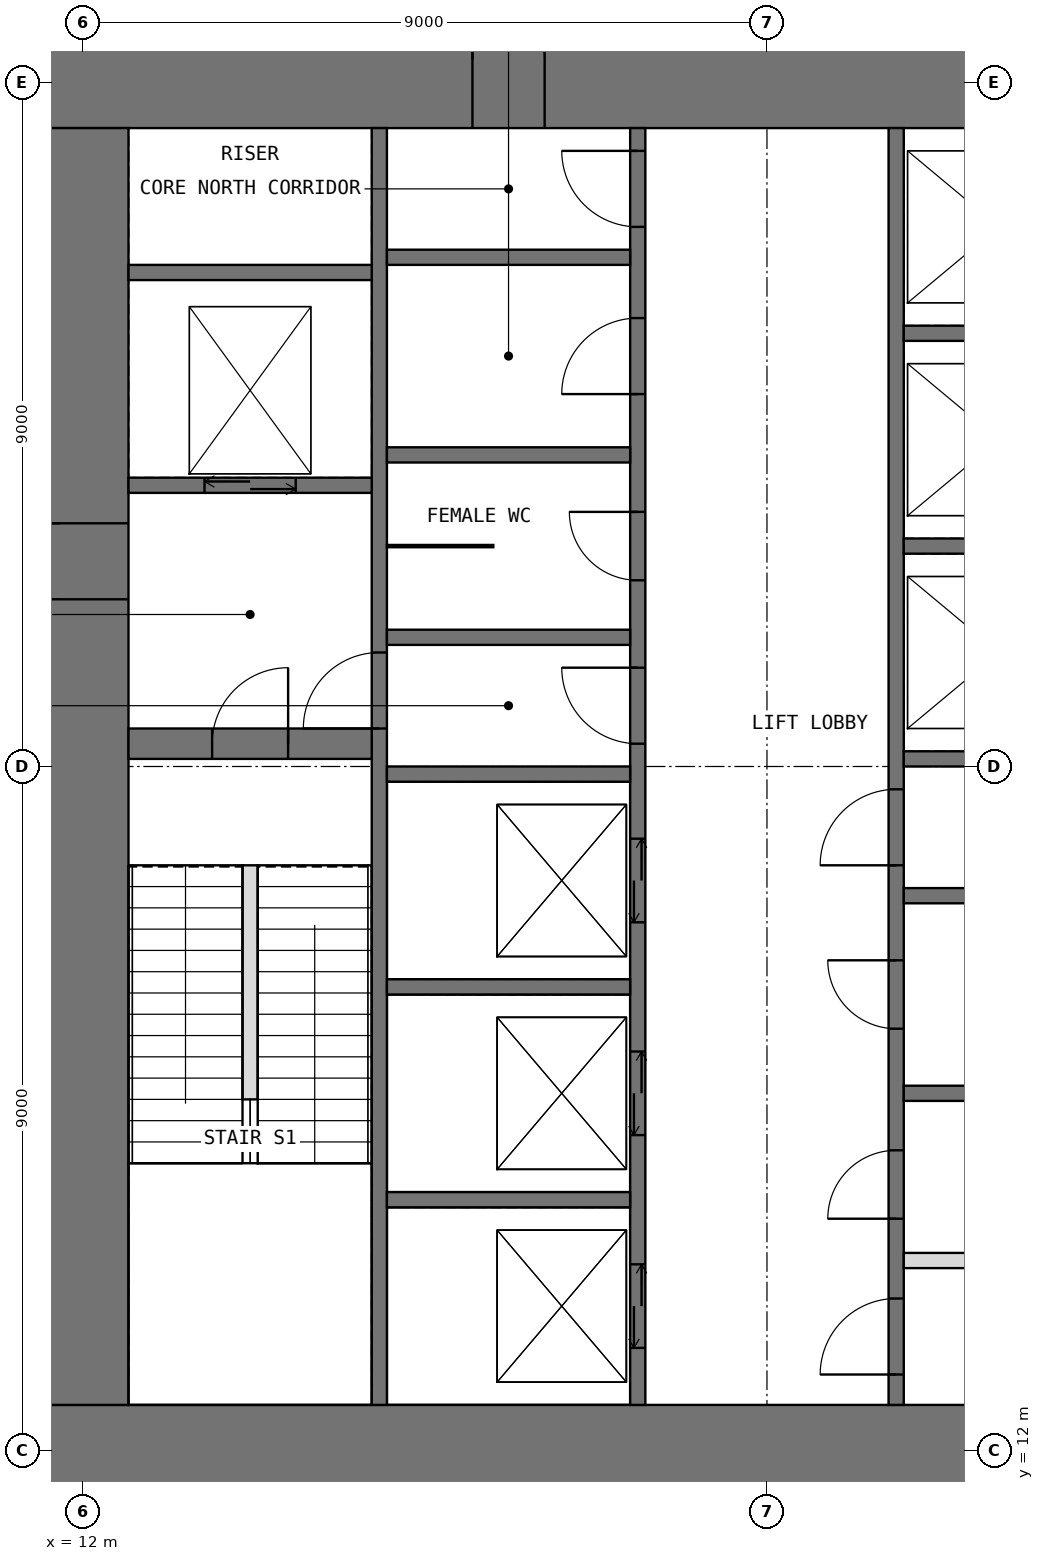
"""IFC4 building model, lengths in metres.
Left out: names, types, materials, properties, quantities, classifications, styles, units other than length and angle.
Written with IfcOpenShell. Run it as: python <this file> out.ifc"""

import sys

from ifc_helpers import new_model, si_unit, direction, frame, frame_2d, origin, place, context, subcontext, project, spatial, rectangle, extrude, element, fill, save


model = new_model("IFC4")
c1 = context("Model", 3, precision=1e-05, world=origin(), true_north=direction((0.0, 1.0)))
c2 = subcontext(c1, "Body", "Model", "MODEL_VIEW")
j1 = project(units=[si_unit("LENGTHUNIT", "METRE"), si_unit("PLANEANGLEUNIT", "RADIAN")], contexts=[c1])
p1 = place(None, origin())
s1 = spatial("IfcSite", under=j1, at=p1, CompositionType="ELEMENT")
p2 = place(p1, origin())
s2 = spatial("IfcBuilding", under=s1, at=p2, CompositionType="ELEMENT")
p3 = place(p2, frame((0.0, 0.0, 86.5)))
s3 = spatial("IfcBuildingStorey", under=s2, at=p3, CompositionType="ELEMENT", Elevation=86.5)
p4 = place(p3, frame((10.8, 11.7, -0.25), z_axis=(0.0, 0.0, 1.0), x_axis=(1.0, 0.0, 0.0)))
e1 = element("IfcWall", 1, at=p4, inside=s3, PredefinedType="SHEAR", context=c2, shape_type="SweptSolid", body=[
    extrude(rectangle(XDim=20.4, YDim=1.8, at=frame_2d((10.2, 0.0))), origin(), (0.0, 0.0, 1.0), 5.2),
])
p5 = place(p4, frame((13.125, 0.0, 0.25)))
e2 = element("IfcOpeningElement", 2, at=p5, cuts=e1, PredefinedType="OPENING", context=c2, shape_type="SweptSolid", body=[
    extrude(rectangle(XDim=0.95, YDim=2.4, at=frame_2d((0.475, 1.2))), frame((0.0, 0.91, 0.0), z_axis=(0.0, -1.0, 0.0), x_axis=(1.0, 0.0, 0.0)), (0.0, 0.0, 1.0), 1.82),
])
p6 = place(p3, frame((10.8, 30.3, -0.25), z_axis=(0.0, 0.0, 1.0), x_axis=(1.0, 0.0, 0.0)))
e3 = element("IfcWall", 3, at=p6, inside=s3, PredefinedType="SHEAR", context=c2, shape_type="SweptSolid", body=[
    extrude(rectangle(XDim=20.4, YDim=1.8, at=frame_2d((10.2, 0.0))), origin(), (0.0, 0.0, 1.0), 5.2),
])
p7 = place(p6, frame((6.325, 0.0, 0.25)))
e4 = element("IfcOpeningElement", 4, at=p7, cuts=e3, PredefinedType="OPENING", context=c2, shape_type="SweptSolid", body=[
    extrude(rectangle(XDim=0.95, YDim=2.4, at=frame_2d((0.475, 1.2))), frame((0.0, 0.91, 0.0), z_axis=(0.0, -1.0, 0.0), x_axis=(1.0, 0.0, 0.0)), (0.0, 0.0, 1.0), 1.82),
])
p8 = place(p3, frame((11.7, 12.6, -0.25), z_axis=(0.0, 0.0, 1.0), x_axis=(0.0, 1.0, 0.0)))
e5 = element("IfcWall", 5, at=p8, inside=s3, PredefinedType="SHEAR", context=c2, shape_type="SweptSolid", body=[
    extrude(rectangle(XDim=16.8, YDim=1.8, at=frame_2d((8.4, 0.0))), origin(), (0.0, 0.0, 1.0), 5.2),
])
p9 = place(p8, frame((10.6, 0.0, 0.25)))
e6 = element("IfcOpeningElement", 6, at=p9, cuts=e5, PredefinedType="OPENING", context=c2, shape_type="SweptSolid", body=[
    extrude(rectangle(XDim=1.0, YDim=2.2, at=frame_2d((0.5, 1.1))), frame((0.0, 0.91, 0.0), z_axis=(0.0, -1.0, 0.0), x_axis=(1.0, 0.0, 0.0)), (0.0, 0.0, 1.0), 1.82),
])
p10 = place(p3, frame((15.9, 12.6, -0.25), z_axis=(0.0, 0.0, 1.0), x_axis=(0.0, 1.0, 0.0)))
e7 = element("IfcWall", 7, at=p10, inside=s3, PredefinedType="SHEAR", context=c2, shape_type="SweptSolid", body=[
    extrude(rectangle(XDim=16.8, YDim=0.2, at=frame_2d((8.4, 0.0))), origin(), (0.0, 0.0, 1.0), 5.2),
])
p11 = place(p10, frame((8.9, 0.0, 0.25)))
e8 = element("IfcOpeningElement", 8, at=p11, cuts=e7, PredefinedType="OPENING", context=c2, shape_type="SweptSolid", body=[
    extrude(rectangle(XDim=1.0, YDim=2.2, at=frame_2d((0.5, 1.1))), frame((0.0, 0.11, 0.0), z_axis=(0.0, -1.0, 0.0), x_axis=(1.0, 0.0, 0.0)), (0.0, 0.0, 1.0), 0.22),
])
p12 = place(p3, frame((19.3, 12.6, -0.25), z_axis=(0.0, 0.0, 1.0), x_axis=(0.0, 1.0, 0.0)))
e9 = element("IfcWall", 9, at=p12, inside=s3, PredefinedType="SHEAR", context=c2, shape_type="SweptSolid", body=[
    extrude(rectangle(XDim=16.8, YDim=0.2, at=frame_2d((8.4, 0.0))), origin(), (0.0, 0.0, 1.0), 5.2),
])
p13 = place(p12, frame((8.7, 0.0, 0.25)))
e10 = element("IfcOpeningElement", 10, at=p13, cuts=e9, PredefinedType="OPENING", context=c2, shape_type="SweptSolid", body=[
    extrude(rectangle(XDim=1.0, YDim=2.2, at=frame_2d((0.5, 1.1))), frame((0.0, 0.11, 0.0), z_axis=(0.0, -1.0, 0.0), x_axis=(1.0, 0.0, 0.0)), (0.0, 0.0, 1.0), 0.22),
])
p14 = place(p12, frame((10.85, 0.0, 0.25)))
e11 = element("IfcOpeningElement", 11, at=p14, cuts=e9, PredefinedType="OPENING", context=c2, shape_type="SweptSolid", body=[
    extrude(rectangle(XDim=0.9, YDim=2.2, at=frame_2d((0.45, 1.1))), frame((0.0, 0.11, 0.0), z_axis=(0.0, -1.0, 0.0), x_axis=(1.0, 0.0, 0.0)), (0.0, 0.0, 1.0), 0.22),
])
p15 = place(p12, frame((13.3, 0.0, 0.25)))
e12 = element("IfcOpeningElement", 12, at=p15, cuts=e9, PredefinedType="OPENING", context=c2, shape_type="SweptSolid", body=[
    extrude(rectangle(XDim=1.0, YDim=2.2, at=frame_2d((0.5, 1.1))), frame((0.0, 0.11, 0.0), z_axis=(0.0, -1.0, 0.0), x_axis=(1.0, 0.0, 0.0)), (0.0, 0.0, 1.0), 0.22),
])
p16 = place(p12, frame((15.5, 0.0, 0.25)))
e13 = element("IfcOpeningElement", 13, at=p16, cuts=e9, PredefinedType="OPENING", context=c2, shape_type="SweptSolid", body=[
    extrude(rectangle(XDim=1.0, YDim=2.2, at=frame_2d((0.5, 1.1))), frame((0.0, 0.11, 0.0), z_axis=(0.0, -1.0, 0.0), x_axis=(1.0, 0.0, 0.0)), (0.0, 0.0, 1.0), 0.22),
])
p17 = place(p12, frame((0.75, 0.0, 0.25)))
e14 = element("IfcOpeningElement", 14, at=p17, cuts=e9, PredefinedType="OPENING", context=c2, shape_type="SweptSolid", body=[
    extrude(rectangle(XDim=1.1, YDim=2.2, at=frame_2d((0.55, 1.1))), frame((0.0, 0.11, 0.0), z_axis=(0.0, -1.0, 0.0), x_axis=(1.0, 0.0, 0.0)), (0.0, 0.0, 1.0), 0.22),
])
p18 = place(p12, frame((3.55, 0.0, 0.25)))
e15 = element("IfcOpeningElement", 15, at=p18, cuts=e9, PredefinedType="OPENING", context=c2, shape_type="SweptSolid", body=[
    extrude(rectangle(XDim=1.1, YDim=2.2, at=frame_2d((0.55, 1.1))), frame((0.0, 0.11, 0.0), z_axis=(0.0, -1.0, 0.0), x_axis=(1.0, 0.0, 0.0)), (0.0, 0.0, 1.0), 0.22),
])
p19 = place(p12, frame((6.35, 0.0, 0.25)))
e16 = element("IfcOpeningElement", 16, at=p19, cuts=e9, PredefinedType="OPENING", context=c2, shape_type="SweptSolid", body=[
    extrude(rectangle(XDim=1.1, YDim=2.2, at=frame_2d((0.55, 1.1))), frame((0.0, 0.11, 0.0), z_axis=(0.0, -1.0, 0.0), x_axis=(1.0, 0.0, 0.0)), (0.0, 0.0, 1.0), 0.22),
])
p20 = place(p3, frame((22.7, 12.6, -0.25), z_axis=(0.0, 0.0, 1.0), x_axis=(0.0, 1.0, 0.0)))
e17 = element("IfcWall", 17, at=p20, inside=s3, PredefinedType="SHEAR", context=c2, shape_type="SweptSolid", body=[
    extrude(rectangle(XDim=16.8, YDim=0.2, at=frame_2d((8.4, 0.0))), origin(), (0.0, 0.0, 1.0), 5.2),
])
p21 = place(p20, frame((0.4, 0.0, 0.25)))
e18 = element("IfcOpeningElement", 18, at=p21, cuts=e17, PredefinedType="OPENING", context=c2, shape_type="SweptSolid", body=[
    extrude(rectangle(XDim=1.0, YDim=2.2, at=frame_2d((0.5, 1.1))), frame((0.0, 0.11, 0.0), z_axis=(0.0, -1.0, 0.0), x_axis=(1.0, 0.0, 0.0)), (0.0, 0.0, 1.0), 0.22),
])
p22 = place(p20, frame((7.1, 0.0, 0.25)))
e19 = element("IfcOpeningElement", 19, at=p22, cuts=e17, PredefinedType="OPENING", context=c2, shape_type="SweptSolid", body=[
    extrude(rectangle(XDim=1.0, YDim=2.2, at=frame_2d((0.5, 1.1))), frame((0.0, 0.11, 0.0), z_axis=(0.0, -1.0, 0.0), x_axis=(1.0, 0.0, 0.0)), (0.0, 0.0, 1.0), 0.22),
])
p23 = place(p20, frame((2.45, 0.0, 0.25)))
e20 = element("IfcOpeningElement", 20, at=p23, cuts=e17, PredefinedType="OPENING", context=c2, shape_type="SweptSolid", body=[
    extrude(rectangle(XDim=0.9, YDim=2.2, at=frame_2d((0.45, 1.1))), frame((0.0, 0.11, 0.0), z_axis=(0.0, -1.0, 0.0), x_axis=(1.0, 0.0, 0.0)), (0.0, 0.0, 1.0), 0.22),
])
p24 = place(p20, frame((4.95, 0.0, 0.25)))
e21 = element("IfcOpeningElement", 21, at=p24, cuts=e17, PredefinedType="OPENING", context=c2, shape_type="SweptSolid", body=[
    extrude(rectangle(XDim=0.9, YDim=2.2, at=frame_2d((0.45, 1.1))), frame((0.0, 0.11, 0.0), z_axis=(0.0, -1.0, 0.0), x_axis=(1.0, 0.0, 0.0)), (0.0, 0.0, 1.0), 0.22),
])
p25 = place(p3, frame((12.6, 21.3, -0.25), z_axis=(0.0, 0.0, 1.0), x_axis=(1.0, 0.0, 0.0)))
e22 = element("IfcWall", 22, at=p25, inside=s3, PredefinedType="SHEAR", context=c2, shape_type="SweptSolid", body=[
    extrude(rectangle(XDim=3.2, YDim=0.4, at=frame_2d((1.6, 0.0))), origin(), (0.0, 0.0, 1.0), 5.2),
])
p26 = place(p25, frame((1.1, 0.0, 0.25)))
e23 = element("IfcOpeningElement", 23, at=p26, cuts=e22, PredefinedType="OPENING", context=c2, shape_type="SweptSolid", body=[
    extrude(rectangle(XDim=1.0, YDim=2.2, at=frame_2d((0.5, 1.1))), frame((0.0, 0.21, 0.0), z_axis=(0.0, -1.0, 0.0), x_axis=(1.0, 0.0, 0.0)), (0.0, 0.0, 1.0), 0.42),
])
p27 = place(p3, frame((12.6, 24.7, -0.25), z_axis=(0.0, 0.0, 1.0), x_axis=(1.0, 0.0, 0.0)))
e24 = element("IfcWall", 24, at=p27, inside=s3, PredefinedType="SHEAR", context=c2, shape_type="SweptSolid", body=[
    extrude(rectangle(XDim=3.2, YDim=0.2, at=frame_2d((1.6, 0.0))), origin(), (0.0, 0.0, 1.0), 5.2),
])
p28 = place(p27, frame((1.0, 0.0, 0.25)))
e25 = element("IfcOpeningElement", 25, at=p28, cuts=e24, PredefinedType="OPENING", context=c2, shape_type="SweptSolid", body=[
    extrude(rectangle(XDim=1.2, YDim=2.2, at=frame_2d((0.6, 1.1))), frame((0.0, 0.11, 0.0), z_axis=(0.0, -1.0, 0.0), x_axis=(1.0, 0.0, 0.0)), (0.0, 0.0, 1.0), 0.22),
])
for number, where, z_axis, x_axis in (
    (26, (12.6, 27.5, -0.25), (0.0, 0.0, 1.0), (1.0, 0.0, 0.0)),
    (27, (16.0, 15.3, -0.25), (0.0, 0.0, 1.0), (1.0, 0.0, 0.0)),
    (28, (16.0, 18.1, -0.25), (0.0, 0.0, 1.0), (1.0, 0.0, 0.0)),
    (29, (16.0, 20.9, -0.25), (0.0, 0.0, 1.0), (1.0, 0.0, 0.0)),
    (30, (16.0, 22.7, -0.25), (0.0, 0.0, 1.0), (1.0, 0.0, 0.0)),
    (31, (16.0, 25.1, -0.25), (0.0, 0.0, 1.0), (1.0, 0.0, 0.0)),
    (32, (16.0, 27.7, -0.25), (0.0, 0.0, 1.0), (1.0, 0.0, 0.0)),
    (33, (22.8, 16.7, -0.25), (0.0, 0.0, 1.0), (1.0, 0.0, 0.0)),
    (34, (22.8, 19.3, -0.25), (0.0, 0.0, 1.0), (1.0, 0.0, 0.0)),
    (35, (22.8, 21.1, -0.25), (0.0, 0.0, 1.0), (1.0, 0.0, 0.0)),
    (36, (22.8, 23.9, -0.25), (0.0, 0.0, 1.0), (1.0, 0.0, 0.0)),
    (37, (22.8, 26.7, -0.25), (0.0, 0.0, 1.0), (1.0, 0.0, 0.0)),
):
    element("IfcWall", number, at=place(p3, frame(where, z_axis=z_axis, x_axis=x_axis)), inside=s3, PredefinedType="SHEAR", context=c2, shape_type="SweptSolid", body=[
        extrude(rectangle(XDim=3.2, YDim=0.2, at=frame_2d((1.6, 0.0))), origin(), (0.0, 0.0, 1.0), 5.2),
    ])
p29 = place(p3, frame((22.8, 14.5, 0.0), z_axis=(0.0, 0.0, 1.0), x_axis=(1.0, 0.0, 0.0)))
e38 = element("IfcWall", 38, at=p29, inside=s3, PredefinedType="PARTITIONING", context=c2, shape_type="SweptSolid", body=[
    extrude(rectangle(XDim=3.2, YDim=0.2, at=frame_2d((1.6, 0.0))), origin(), (0.0, 0.0, 1.0), 4.75),
])
p30 = place(p3, frame((16.0, 23.9, 0.0), z_axis=(0.0, 0.0, 1.0), x_axis=(1.0, 0.0, 0.0)))
e39 = element("IfcWall", 39, at=p30, inside=s3, PredefinedType="PARTITIONING", context=c2, shape_type="SweptSolid", body=[
    extrude(rectangle(XDim=1.4, YDim=0.03, at=frame_2d((0.7, 0.0))), origin(), (0.0, 0.0, 1.0), 4.75),
])
p31 = place(p3, frame((14.2, 16.62, 0.0), z_axis=(0.0, 0.0, 1.0), x_axis=(0.0, 1.0, 0.0)))
e40 = element("IfcWall", 40, at=p31, inside=s3, PredefinedType="PARTITIONING", context=c2, shape_type="SweptSolid", body=[
    extrude(rectangle(XDim=3.08, YDim=0.2, at=frame_2d((1.54, 0.0))), origin(), (0.0, 0.0, 1.0), 5.0),
])
p32 = place(p21, origin())
e41 = element("IfcDoor", 41, at=p32, inside=s3, OperationType="SINGLE_SWING_LEFT", PredefinedType="DOOR", context=c2, shape_type="SweptSolid", body=[
    extrude(rectangle(XDim=1.0, YDim=2.2, at=frame_2d((0.5, 1.1))), frame((0.0, 0.025, 0.0), z_axis=(0.0, -1.0, 0.0), x_axis=(1.0, 0.0, 0.0)), (0.0, 0.0, 1.0), 0.05),
])
fill(e18, e41)
p33 = place(p7, origin())
e42 = element("IfcDoor", 42, at=p33, inside=s3, OperationType="SINGLE_SWING_LEFT", PredefinedType="DOOR", context=c2, shape_type="SweptSolid", body=[
    extrude(rectangle(XDim=0.95, YDim=2.4, at=frame_2d((0.475, 1.2))), frame((0.0, 0.025, 0.0), z_axis=(0.0, -1.0, 0.0), x_axis=(1.0, 0.0, 0.0)), (0.0, 0.0, 1.0), 0.05),
])
fill(e4, e42)
p34 = place(p9, origin())
e43 = element("IfcDoor", 43, at=p34, inside=s3, OperationType="SINGLE_SWING_RIGHT", PredefinedType="DOOR", context=c2, shape_type="SweptSolid", body=[
    extrude(rectangle(XDim=1.0, YDim=2.2, at=frame_2d((0.5, 1.1))), frame((0.0, 0.025, 0.0), z_axis=(0.0, -1.0, 0.0), x_axis=(1.0, 0.0, 0.0)), (0.0, 0.0, 1.0), 0.05),
])
fill(e6, e43)
p35 = place(p26, origin())
e44 = element("IfcDoor", 44, at=p35, inside=s3, OperationType="SINGLE_SWING_RIGHT", PredefinedType="DOOR", context=c2, shape_type="SweptSolid", body=[
    extrude(rectangle(XDim=1.0, YDim=2.2, at=frame_2d((0.5, 1.1))), frame((0.0, 0.025, 0.0), z_axis=(0.0, -1.0, 0.0), x_axis=(1.0, 0.0, 0.0)), (0.0, 0.0, 1.0), 0.05),
])
fill(e23, e44)
p36 = place(p11, origin())
e45 = element("IfcDoor", 45, at=p36, inside=s3, OperationType="SINGLE_SWING_LEFT", PredefinedType="DOOR", context=c2, shape_type="SweptSolid", body=[
    extrude(rectangle(XDim=1.0, YDim=2.2, at=frame_2d((0.5, 1.1))), frame((0.0, 0.025, 0.0), z_axis=(0.0, -1.0, 0.0), x_axis=(1.0, 0.0, 0.0)), (0.0, 0.0, 1.0), 0.05),
])
fill(e8, e45)
p37 = place(p13, origin())
e46 = element("IfcDoor", 46, at=p37, inside=s3, OperationType="SINGLE_SWING_RIGHT", PredefinedType="DOOR", context=c2, shape_type="SweptSolid", body=[
    extrude(rectangle(XDim=1.0, YDim=2.2, at=frame_2d((0.5, 1.1))), frame((0.0, 0.025, 0.0), z_axis=(0.0, -1.0, 0.0), x_axis=(1.0, 0.0, 0.0)), (0.0, 0.0, 1.0), 0.05),
])
fill(e10, e46)
p38 = place(p22, origin())
e47 = element("IfcDoor", 47, at=p38, inside=s3, OperationType="SINGLE_SWING_LEFT", PredefinedType="DOOR", context=c2, shape_type="SweptSolid", body=[
    extrude(rectangle(XDim=1.0, YDim=2.2, at=frame_2d((0.5, 1.1))), frame((0.0, 0.025, 0.0), z_axis=(0.0, -1.0, 0.0), x_axis=(1.0, 0.0, 0.0)), (0.0, 0.0, 1.0), 0.05),
])
fill(e19, e47)
p39 = place(p14, origin())
e48 = element("IfcDoor", 48, at=p39, inside=s3, OperationType="SINGLE_SWING_RIGHT", PredefinedType="DOOR", context=c2, shape_type="SweptSolid", body=[
    extrude(rectangle(XDim=0.9, YDim=2.2, at=frame_2d((0.45, 1.1))), frame((0.0, 0.025, 0.0), z_axis=(0.0, -1.0, 0.0), x_axis=(1.0, 0.0, 0.0)), (0.0, 0.0, 1.0), 0.05),
])
fill(e11, e48)
p40 = place(p15, origin())
e49 = element("IfcDoor", 49, at=p40, inside=s3, OperationType="SINGLE_SWING_LEFT", PredefinedType="DOOR", context=c2, shape_type="SweptSolid", body=[
    extrude(rectangle(XDim=1.0, YDim=2.2, at=frame_2d((0.5, 1.1))), frame((0.0, 0.025, 0.0), z_axis=(0.0, -1.0, 0.0), x_axis=(1.0, 0.0, 0.0)), (0.0, 0.0, 1.0), 0.05),
])
fill(e12, e49)
p41 = place(p16, origin())
e50 = element("IfcDoor", 50, at=p41, inside=s3, OperationType="SINGLE_SWING_RIGHT", PredefinedType="DOOR", context=c2, shape_type="SweptSolid", body=[
    extrude(rectangle(XDim=1.0, YDim=2.2, at=frame_2d((0.5, 1.1))), frame((0.0, 0.025, 0.0), z_axis=(0.0, -1.0, 0.0), x_axis=(1.0, 0.0, 0.0)), (0.0, 0.0, 1.0), 0.05),
])
fill(e13, e50)
p42 = place(p23, origin())
e51 = element("IfcDoor", 51, at=p42, inside=s3, OperationType="SINGLE_SWING_LEFT", PredefinedType="DOOR", context=c2, shape_type="SweptSolid", body=[
    extrude(rectangle(XDim=0.9, YDim=2.2, at=frame_2d((0.45, 1.1))), frame((0.0, 0.025, 0.0), z_axis=(0.0, -1.0, 0.0), x_axis=(1.0, 0.0, 0.0)), (0.0, 0.0, 1.0), 0.05),
])
fill(e20, e51)
p43 = place(p24, origin())
e52 = element("IfcDoor", 52, at=p43, inside=s3, OperationType="SINGLE_SWING_RIGHT", PredefinedType="DOOR", context=c2, shape_type="SweptSolid", body=[
    extrude(rectangle(XDim=0.9, YDim=2.2, at=frame_2d((0.45, 1.1))), frame((0.0, 0.025, 0.0), z_axis=(0.0, -1.0, 0.0), x_axis=(1.0, 0.0, 0.0)), (0.0, 0.0, 1.0), 0.05),
])
fill(e21, e52)
p44 = place(p17, origin())
e53 = element("IfcDoor", 53, at=p44, inside=s3, OperationType="DOUBLE_DOOR_SLIDING", PredefinedType="DOOR", context=c2, shape_type="SweptSolid", body=[
    extrude(rectangle(XDim=1.1, YDim=2.2, at=frame_2d((0.55, 1.1))), frame((0.0, 0.025, 0.0), z_axis=(0.0, -1.0, 0.0), x_axis=(1.0, 0.0, 0.0)), (0.0, 0.0, 1.0), 0.05),
])
fill(e14, e53)
p45 = place(p18, origin())
e54 = element("IfcDoor", 54, at=p45, inside=s3, OperationType="DOUBLE_DOOR_SLIDING", PredefinedType="DOOR", context=c2, shape_type="SweptSolid", body=[
    extrude(rectangle(XDim=1.1, YDim=2.2, at=frame_2d((0.55, 1.1))), frame((0.0, 0.025, 0.0), z_axis=(0.0, -1.0, 0.0), x_axis=(1.0, 0.0, 0.0)), (0.0, 0.0, 1.0), 0.05),
])
fill(e15, e54)
p46 = place(p19, origin())
e55 = element("IfcDoor", 55, at=p46, inside=s3, OperationType="DOUBLE_DOOR_SLIDING", PredefinedType="DOOR", context=c2, shape_type="SweptSolid", body=[
    extrude(rectangle(XDim=1.1, YDim=2.2, at=frame_2d((0.55, 1.1))), frame((0.0, 0.025, 0.0), z_axis=(0.0, -1.0, 0.0), x_axis=(1.0, 0.0, 0.0)), (0.0, 0.0, 1.0), 0.05),
])
fill(e16, e55)
p47 = place(p28, origin())
e56 = element("IfcDoor", 56, at=p47, inside=s3, OperationType="DOUBLE_DOOR_SLIDING", PredefinedType="DOOR", context=c2, shape_type="SweptSolid", body=[
    extrude(rectangle(XDim=1.2, YDim=2.2, at=frame_2d((0.6, 1.1))), frame((0.0, 0.025, 0.0), z_axis=(0.0, -1.0, 0.0), x_axis=(1.0, 0.0, 0.0)), (0.0, 0.0, 1.0), 0.05),
])
fill(e25, e56)
save(model, sys.argv[1])
